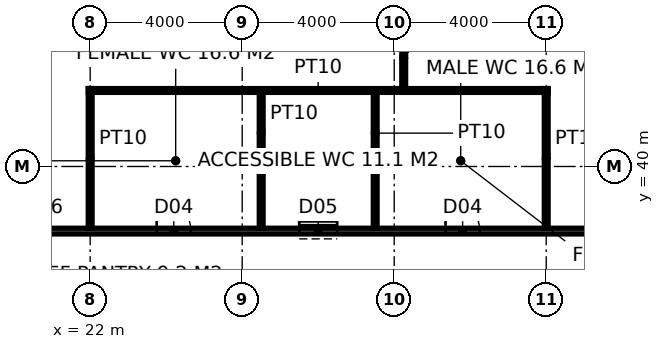
"""IFC4 building model, lengths in metres.
Left out: names, types, materials, properties, quantities, classifications, styles, units other than length and angle.
Written with IfcOpenShell. Run it as: python <this file> out.ifc"""

import sys

from ifc_helpers import new_model, si_unit, direction, frame, frame_2d, origin, place, context, subcontext, project, spatial, rectangle, extrude, element, fill, save


model = new_model("IFC4")
c1 = context("Model", 3, precision=1e-05, world=origin(), true_north=direction((0.0, 1.0)))
c2 = subcontext(c1, "Body", "Model", "MODEL_VIEW")
j1 = project(units=[si_unit("LENGTHUNIT", "METRE"), si_unit("PLANEANGLEUNIT", "RADIAN")], contexts=[c1])
p1 = place(None, origin())
s1 = spatial("IfcSite", under=j1, at=p1, CompositionType="ELEMENT")
p2 = place(p1, origin())
s2 = spatial("IfcBuilding", under=s1, at=p2, CompositionType="ELEMENT")
p3 = place(p2, frame((0.0, 0.0, 278.2)))
s3 = spatial("IfcBuildingStorey", under=s2, at=p3, CompositionType="ELEMENT", Elevation=278.2)
p4 = place(p3, frame((17.5, 38.3, 0.0), z_axis=(0.0, 0.0, 1.0), x_axis=(1.0, 0.0, 0.0)))
e1 = element("IfcWall", 1, at=p4, inside=s3, PredefinedType="PARTITIONING", context=c2, shape_type="SweptSolid", body=[
    extrude(rectangle(XDim=20.925, YDim=0.15, at=frame_2d((10.462, 0.0))), origin(), (0.0, 0.0, 1.0), 3.85),
])
p5 = place(p4, frame((6.25, 0.0, 0.0)))
e2 = element("IfcOpeningElement", 2, at=p5, cuts=e1, PredefinedType="OPENING", context=c2, shape_type="SweptSolid", body=[
    extrude(rectangle(XDim=0.9, YDim=2.1, at=frame_2d((0.45, 1.05))), frame((0.0, 0.085, 0.0), z_axis=(0.0, -1.0, 0.0), x_axis=(1.0, 0.0, 0.0)), (0.0, 0.0, 1.0), 0.17),
])
p6 = place(p4, frame((10.0, 0.0, 0.0)))
e3 = element("IfcOpeningElement", 3, at=p6, cuts=e1, PredefinedType="OPENING", context=c2, shape_type="SweptSolid", body=[
    extrude(rectangle(XDim=1.0, YDim=2.1, at=frame_2d((0.5, 1.05))), frame((0.0, 0.085, 0.0), z_axis=(0.0, -1.0, 0.0), x_axis=(1.0, 0.0, 0.0)), (0.0, 0.0, 1.0), 0.17),
])
p7 = place(p4, frame((13.85, 0.0, 0.0)))
e4 = element("IfcOpeningElement", 4, at=p7, cuts=e1, PredefinedType="OPENING", context=c2, shape_type="SweptSolid", body=[
    extrude(rectangle(XDim=0.9, YDim=2.1, at=frame_2d((0.45, 1.05))), frame((0.0, 0.085, 0.0), z_axis=(0.0, -1.0, 0.0), x_axis=(1.0, 0.0, 0.0)), (0.0, 0.0, 1.0), 0.17),
])
for number, where, z_axis, x_axis in (
    (5, (22.0, 38.375, 0.0), (0.0, 0.0, 1.0), (0.0, 1.0, 0.0)),
    (6, (34.0, 38.375, 0.0), (0.0, 0.0, 1.0), (0.0, 1.0, 0.0)),
):
    element("IfcWall", number, at=place(p3, frame(where, z_axis=z_axis, x_axis=x_axis)), inside=s3, PredefinedType="PARTITIONING", context=c2, shape_type="SweptSolid", body=[
        extrude(rectangle(XDim=3.675, YDim=0.1, at=frame_2d((1.837, 0.0))), origin(), (0.0, 0.0, 1.0), 2.95),
    ])
p8 = place(p3, frame((21.95, 42.0, 0.0), z_axis=(0.0, 0.0, 1.0), x_axis=(1.0, 0.0, 0.0)))
e7 = element("IfcWall", 7, at=p8, inside=s3, PredefinedType="PARTITIONING", context=c2, shape_type="SweptSolid", body=[
    extrude(rectangle(XDim=12.1, YDim=0.1, at=frame_2d((6.05, 0.0))), origin(), (0.0, 0.0, 1.0), 3.85),
])
for number, where, z_axis, x_axis in (
    (8, (26.5, 38.375, 0.0), (0.0, 0.0, 1.0), (0.0, 1.0, 0.0)),
    (9, (29.5, 38.375, 0.0), (0.0, 0.0, 1.0), (0.0, 1.0, 0.0)),
):
    element("IfcWall", number, at=place(p3, frame(where, z_axis=z_axis, x_axis=x_axis)), inside=s3, PredefinedType="PARTITIONING", context=c2, shape_type="SweptSolid", body=[
        extrude(rectangle(XDim=3.575, YDim=0.1, at=frame_2d((1.788, 0.0))), origin(), (0.0, 0.0, 1.0), 3.85),
    ])
p9 = place(p3, frame((30.25, 43.7, 0.0), z_axis=(0.0, 0.0, 1.0), x_axis=(0.0, -1.0, 0.0)))
e10 = element("IfcWall", 10, at=p9, inside=s3, PredefinedType="PARTITIONING", context=c2, shape_type="SweptSolid", body=[
    extrude(rectangle(XDim=1.7, YDim=0.1, at=frame_2d((0.85, 0.0))), origin(), (0.0, 0.0, 1.0), 2.95),
])
p10 = place(p5, origin())
e11 = element("IfcDoor", 11, at=p10, inside=s3, OperationType="SINGLE_SWING_LEFT", PredefinedType="DOOR", context=c2, shape_type="SweptSolid", body=[
    extrude(rectangle(XDim=0.9, YDim=2.1, at=frame_2d((0.45, 1.05))), frame((0.0, 0.025, 0.0), z_axis=(0.0, -1.0, 0.0), x_axis=(1.0, 0.0, 0.0)), (0.0, 0.0, 1.0), 0.05),
])
fill(e2, e11)
p11 = place(p6, origin())
e12 = element("IfcDoor", 12, at=p11, inside=s3, OperationType="SLIDING_TO_LEFT", PredefinedType="DOOR", context=c2, shape_type="SweptSolid", body=[
    extrude(rectangle(XDim=1.0, YDim=2.1, at=frame_2d((0.5, 1.05))), frame((0.0, 0.025, 0.0), z_axis=(0.0, -1.0, 0.0), x_axis=(1.0, 0.0, 0.0)), (0.0, 0.0, 1.0), 0.05),
])
fill(e3, e12)
p12 = place(p7, origin())
e13 = element("IfcDoor", 13, at=p12, inside=s3, OperationType="SINGLE_SWING_LEFT", PredefinedType="DOOR", context=c2, shape_type="SweptSolid", body=[
    extrude(rectangle(XDim=0.9, YDim=2.1, at=frame_2d((0.45, 1.05))), frame((0.0, 0.025, 0.0), z_axis=(0.0, -1.0, 0.0), x_axis=(1.0, 0.0, 0.0)), (0.0, 0.0, 1.0), 0.05),
])
fill(e4, e13)
save(model, sys.argv[1])
